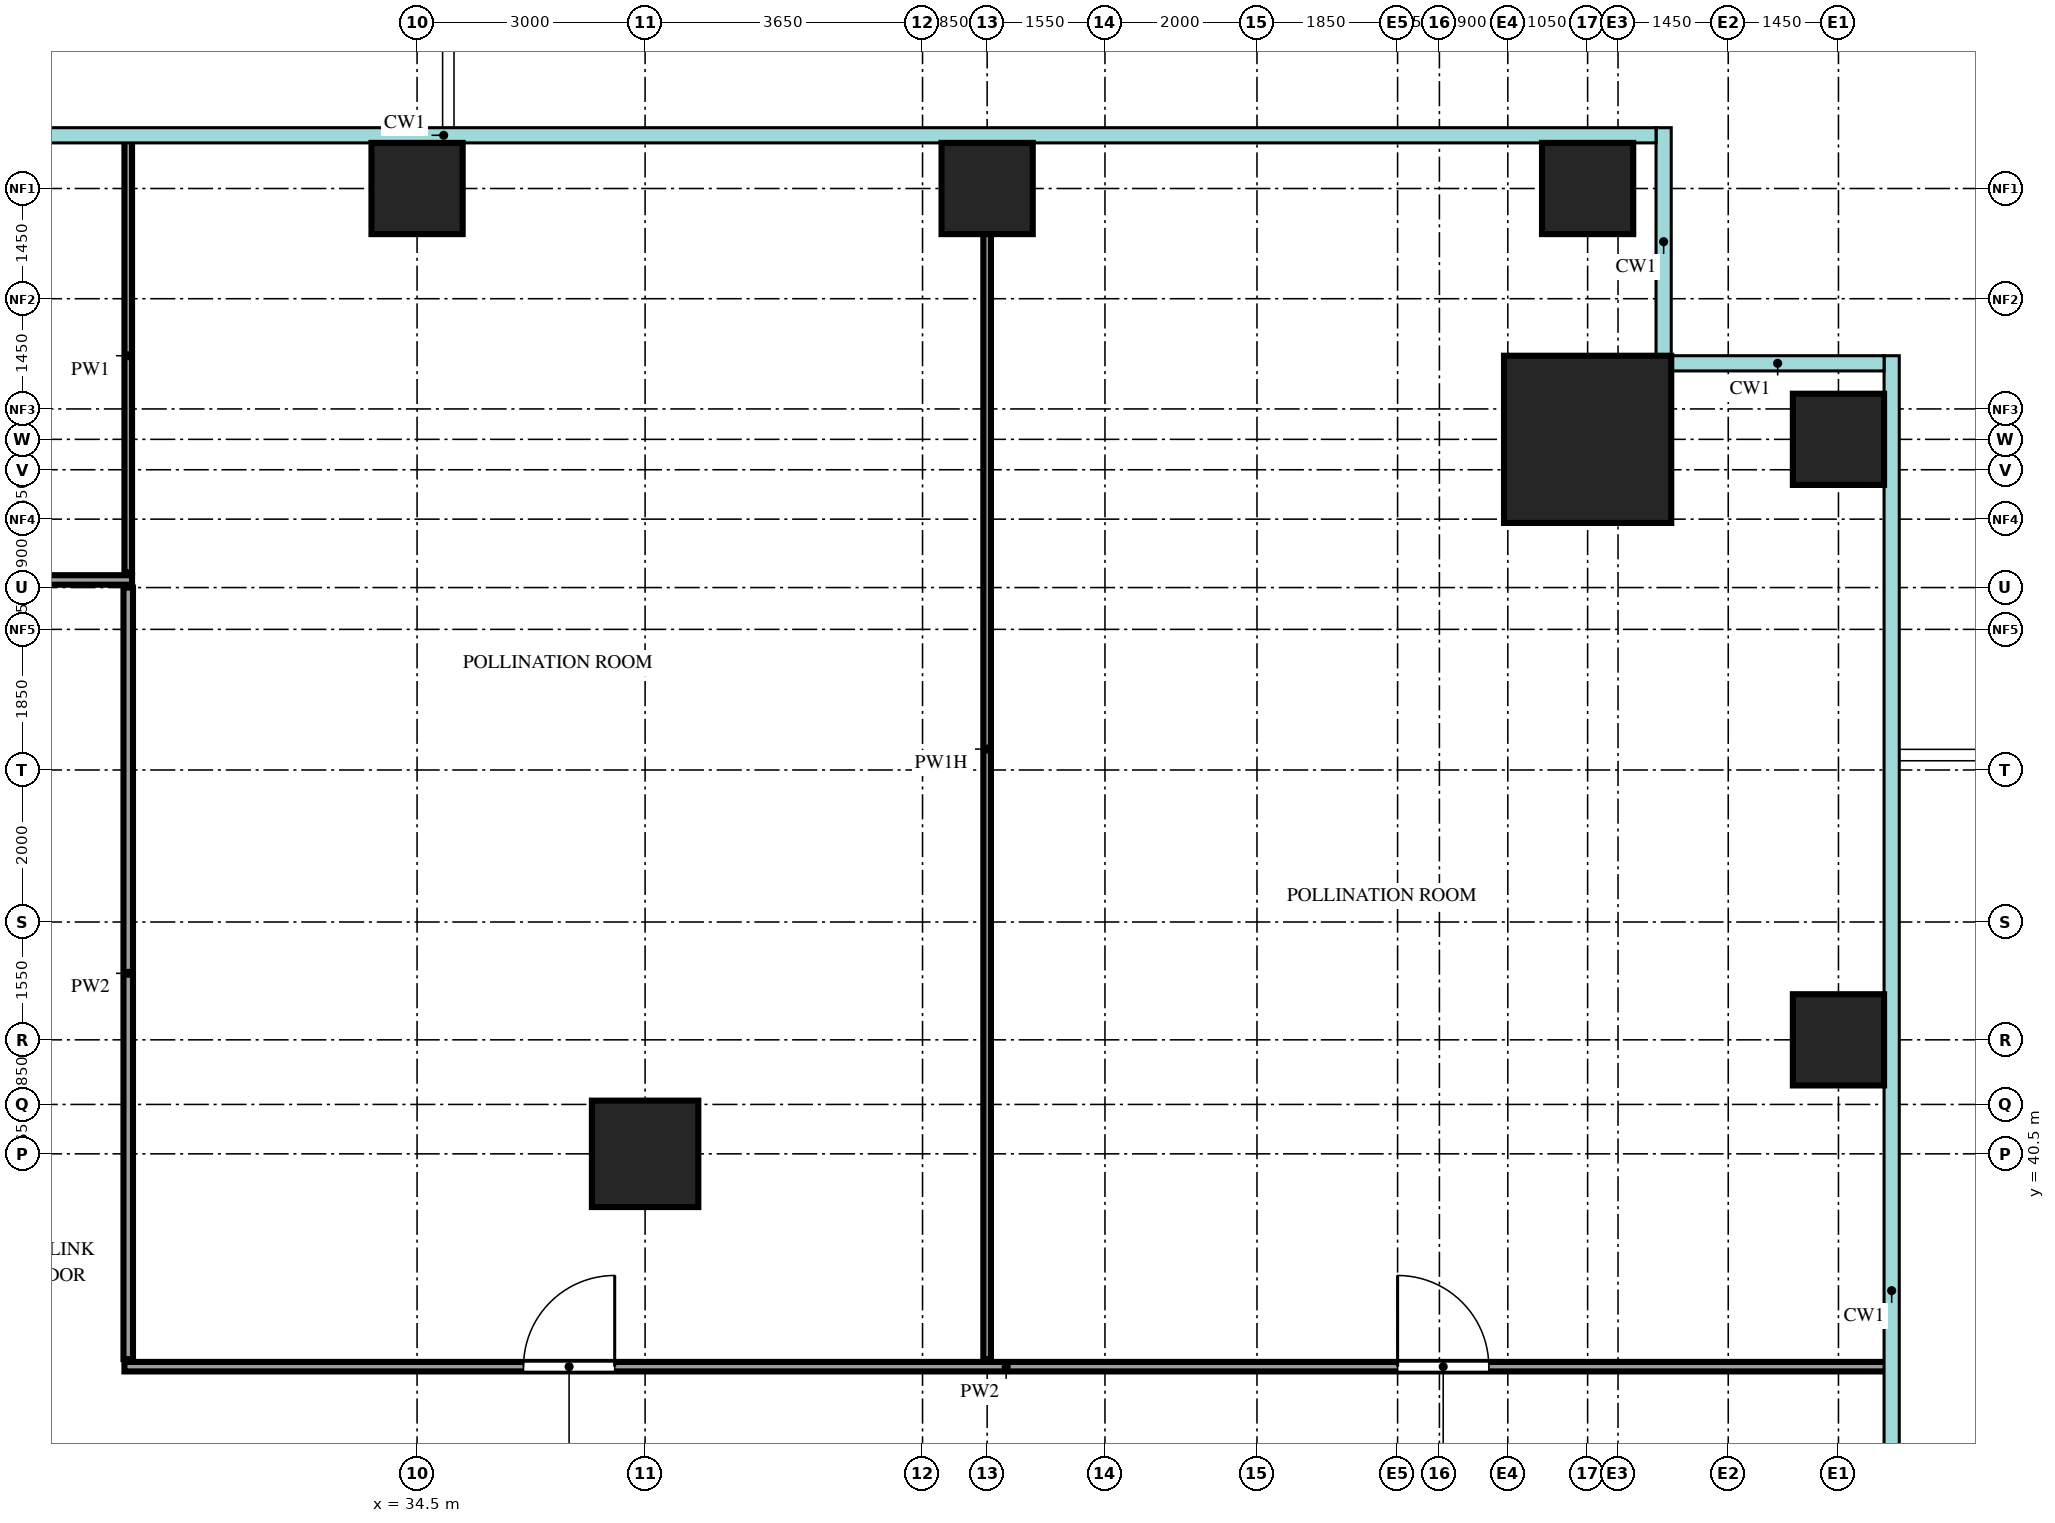
"""IFC4 building model, lengths in metres.
Left out: names, types, materials, properties, quantities, classifications, styles, units other than length and angle.
Written with IfcOpenShell. Run it as: python <this file> out.ifc"""

import sys

from ifc_helpers import new_model, si_unit, direction, frame, frame_2d, origin, origin_2d, place, context, subcontext, project, spatial, rectangle, extrude, source, transform, mapped, element, fill, save


model = new_model("IFC4")
c1 = context("Model", 3, precision=1e-05, world=origin(), true_north=direction((0.0, 1.0)))
c2 = subcontext(c1, "Body", "Model", "MODEL_VIEW")
j1 = project(units=[si_unit("LENGTHUNIT", "METRE"), si_unit("PLANEANGLEUNIT", "RADIAN")], contexts=[c1])
p1 = place(None, origin())
s1 = spatial("IfcSite", under=j1, at=p1, CompositionType="ELEMENT")
p2 = place(p1, origin())
s2 = spatial("IfcBuilding", under=s1, at=p2, CompositionType="ELEMENT")
p3 = place(p2, frame((0.0, 0.0, 78.0)))
s3 = spatial("IfcBuildingStorey", under=s2, at=p3, CompositionType="ELEMENT", Elevation=78.0)
m1 = source(origin(), c2, "Body", "SweptSolid", [
    extrude(rectangle(XDim=2.2, YDim=2.2, at=origin_2d()), origin(), (0.0, 0.0, 1.0), 4.5),
])
p4 = place(p3, frame((49.9, 49.9, 0.0), z_axis=(0.0, 0.0, 1.0), x_axis=(1.0, 0.0, 0.0)))
e1 = element("IfcColumn", 1, at=p4, inside=s3, PredefinedType="COLUMN", context=c2, shape_type="MappedRepresentation", body=[
    mapped(m1, transform((0.0, 0.0, 0.0))),
])
m2 = source(origin(), c2, "Body", "SweptSolid", [
    extrude(rectangle(XDim=1.2, YDim=1.2, at=origin_2d()), origin(), (0.0, 0.0, 1.0), 4.2),
])
for number, where, z_axis, x_axis in (
    (2, (53.2, 42.0, 0.0), (0.0, 0.0, 1.0), (1.0, 0.0, 0.0)),
    (3, (53.2, 49.9, 0.0), (0.0, 0.0, 1.0), (1.0, 0.0, 0.0)),
    (4, (34.5, 53.2, 0.0), (0.0, 0.0, 1.0), (1.0, 0.0, 0.0)),
    (5, (42.0, 53.2, 0.0), (0.0, 0.0, 1.0), (1.0, 0.0, 0.0)),
    (6, (49.9, 53.2, 0.0), (0.0, 0.0, 1.0), (1.0, 0.0, 0.0)),
):
    element("IfcColumn", number, at=place(p3, frame(where, z_axis=z_axis, x_axis=x_axis)), inside=s3, PredefinedType="COLUMN", context=c2, shape_type="MappedRepresentation", body=[
        mapped(m2, transform((0.0, 0.0, 0.0))),
    ])
m3 = source(origin(), c2, "Body", "SweptSolid", [
    extrude(rectangle(XDim=1.4, YDim=1.4, at=origin_2d()), origin(), (0.0, 0.0, 1.0), 4.2),
])
p5 = place(p3, frame((37.5, 40.5, 0.0), z_axis=(0.0, 0.0, 1.0), x_axis=(1.0, 0.0, 0.0)))
e7 = element("IfcColumn", 7, at=p5, inside=s3, PredefinedType="COLUMN", context=c2, shape_type="MappedRepresentation", body=[
    mapped(m3, transform((0.0, 0.0, 0.0))),
])
m4 = source(origin(), c2, "Body", "SweptSolid", [
    extrude(rectangle(XDim=23.2, YDim=0.125, at=frame_2d((11.6, 0.0))), origin(), (0.0, 0.0, 1.0), 4.3),
])
p6 = place(p3, frame((30.65, 37.7, 0.0), z_axis=(0.0, 0.0, 1.0), x_axis=(1.0, 0.0, 0.0)))
e8 = element("IfcWall", 8, at=p6, inside=s3, PredefinedType="PARTITIONING", context=c2, shape_type="MappedRepresentation", body=[
    mapped(m4, transform((0.0, 0.0, 0.0))),
])
m5 = source(origin(), c2, "Body", "SweptSolid", [
    extrude(rectangle(XDim=1.2, YDim=2.1, at=frame_2d((0.6, 1.05))), frame((0.0, 0.073, 0.0), z_axis=(0.0, -1.0, 0.0), x_axis=(1.0, 0.0, 0.0)), (0.0, 0.0, 1.0), 0.145),
])
p7 = place(p6, frame((5.25, 0.0, 0.0)))
e9 = element("IfcOpeningElement", 9, at=p7, cuts=e8, PredefinedType="OPENING", context=c2, shape_type="MappedRepresentation", body=[
    mapped(m5, transform((0.0, 0.0, 0.0))),
])
p8 = place(p6, frame((16.75, 0.0, 0.0)))
e10 = element("IfcOpeningElement", 10, at=p8, cuts=e8, PredefinedType="OPENING", context=c2, shape_type="MappedRepresentation", body=[
    mapped(m5, transform((0.0, 0.0, 0.0))),
])
m6 = source(origin(), c2, "Body", "SweptSolid", [
    extrude(rectangle(XDim=10.15, YDim=0.125, at=frame_2d((5.075, 0.0))), origin(), (0.0, 0.0, 1.0), 4.3),
])
p9 = place(p3, frame((30.7, 37.8, 0.0), z_axis=(0.0, 0.0, 1.0), x_axis=(0.0, 1.0, 0.0)))
e11 = element("IfcWall", 11, at=p9, inside=s3, PredefinedType="PARTITIONING", context=c2, shape_type="MappedRepresentation", body=[
    mapped(m6, transform((0.0, 0.0, 0.0))),
])
m7 = source(origin(), c2, "Body", "SweptSolid", [
    extrude(rectangle(XDim=16.05, YDim=0.1, at=frame_2d((8.025, 0.0))), origin(), (0.0, 0.0, 1.0), 3.7),
])
p10 = place(p3, frame((42.0, 37.8, 0.0), z_axis=(0.0, 0.0, 1.0), x_axis=(0.0, 1.0, 0.0)))
e12 = element("IfcWall", 12, at=p10, inside=s3, PredefinedType="PARTITIONING", context=c2, shape_type="MappedRepresentation", body=[
    mapped(m7, transform((0.0, 0.0, 0.0))),
])
m8 = source(origin(), c2, "Body", "SweptSolid", [
    extrude(rectangle(XDim=18.8, YDim=0.125, at=frame_2d((9.4, 0.0))), origin(), (0.0, 0.0, 1.0), 4.3),
])
p11 = place(p3, frame((11.95, 48.05, 0.0), z_axis=(0.0, 0.0, 1.0), x_axis=(1.0, 0.0, 0.0)))
e13 = element("IfcWall", 13, at=p11, inside=s3, PredefinedType="PARTITIONING", context=c2, shape_type="MappedRepresentation", body=[
    mapped(m8, transform((0.0, 0.0, 0.0))),
])
p12 = place(p11, frame((8.8, 0.0, 0.0)))
e14 = element("IfcOpeningElement", 14, at=p12, cuts=e13, PredefinedType="OPENING", context=c2, shape_type="MappedRepresentation", body=[
    mapped(m5, transform((0.0, 0.0, 0.0))),
])
m9 = source(origin(), c2, "Body", "SweptSolid", [
    extrude(rectangle(XDim=5.7, YDim=0.1, at=frame_2d((2.85, 0.0))), origin(), (0.0, 0.0, 1.0), 4.3),
])
p13 = place(p3, frame((30.7, 48.15, 0.0), z_axis=(0.0, 0.0, 1.0), x_axis=(0.0, 1.0, 0.0)))
e15 = element("IfcWall", 15, at=p13, inside=s3, PredefinedType="PARTITIONING", context=c2, shape_type="MappedRepresentation", body=[
    mapped(m9, transform((0.0, 0.0, 0.0))),
])
m10 = source(origin(), c2, "Body", "SweptSolid", [
    extrude(rectangle(XDim=1.2, YDim=2.1, at=frame_2d((0.6, 1.05))), frame((0.0, 0.025, 0.0), z_axis=(0.0, -1.0, 0.0), x_axis=(1.0, 0.0, 0.0)), (0.0, 0.0, 1.0), 0.05),
])
p14 = place(p7, origin())
e16 = element("IfcDoor", 16, at=p14, inside=s3, OperationType="SINGLE_SWING_LEFT", PredefinedType="DOOR", context=c2, shape_type="MappedRepresentation", body=[
    mapped(m10, transform((0.0, 0.0, 0.0))),
])
fill(e9, e16)
p15 = place(p8, origin())
e17 = element("IfcDoor", 17, at=p15, inside=s3, OperationType="SINGLE_SWING_RIGHT", PredefinedType="DOOR", context=c2, shape_type="MappedRepresentation", body=[
    mapped(m10, transform((0.0, 0.0, 0.0))),
])
fill(e10, e17)
save(model, sys.argv[1])
